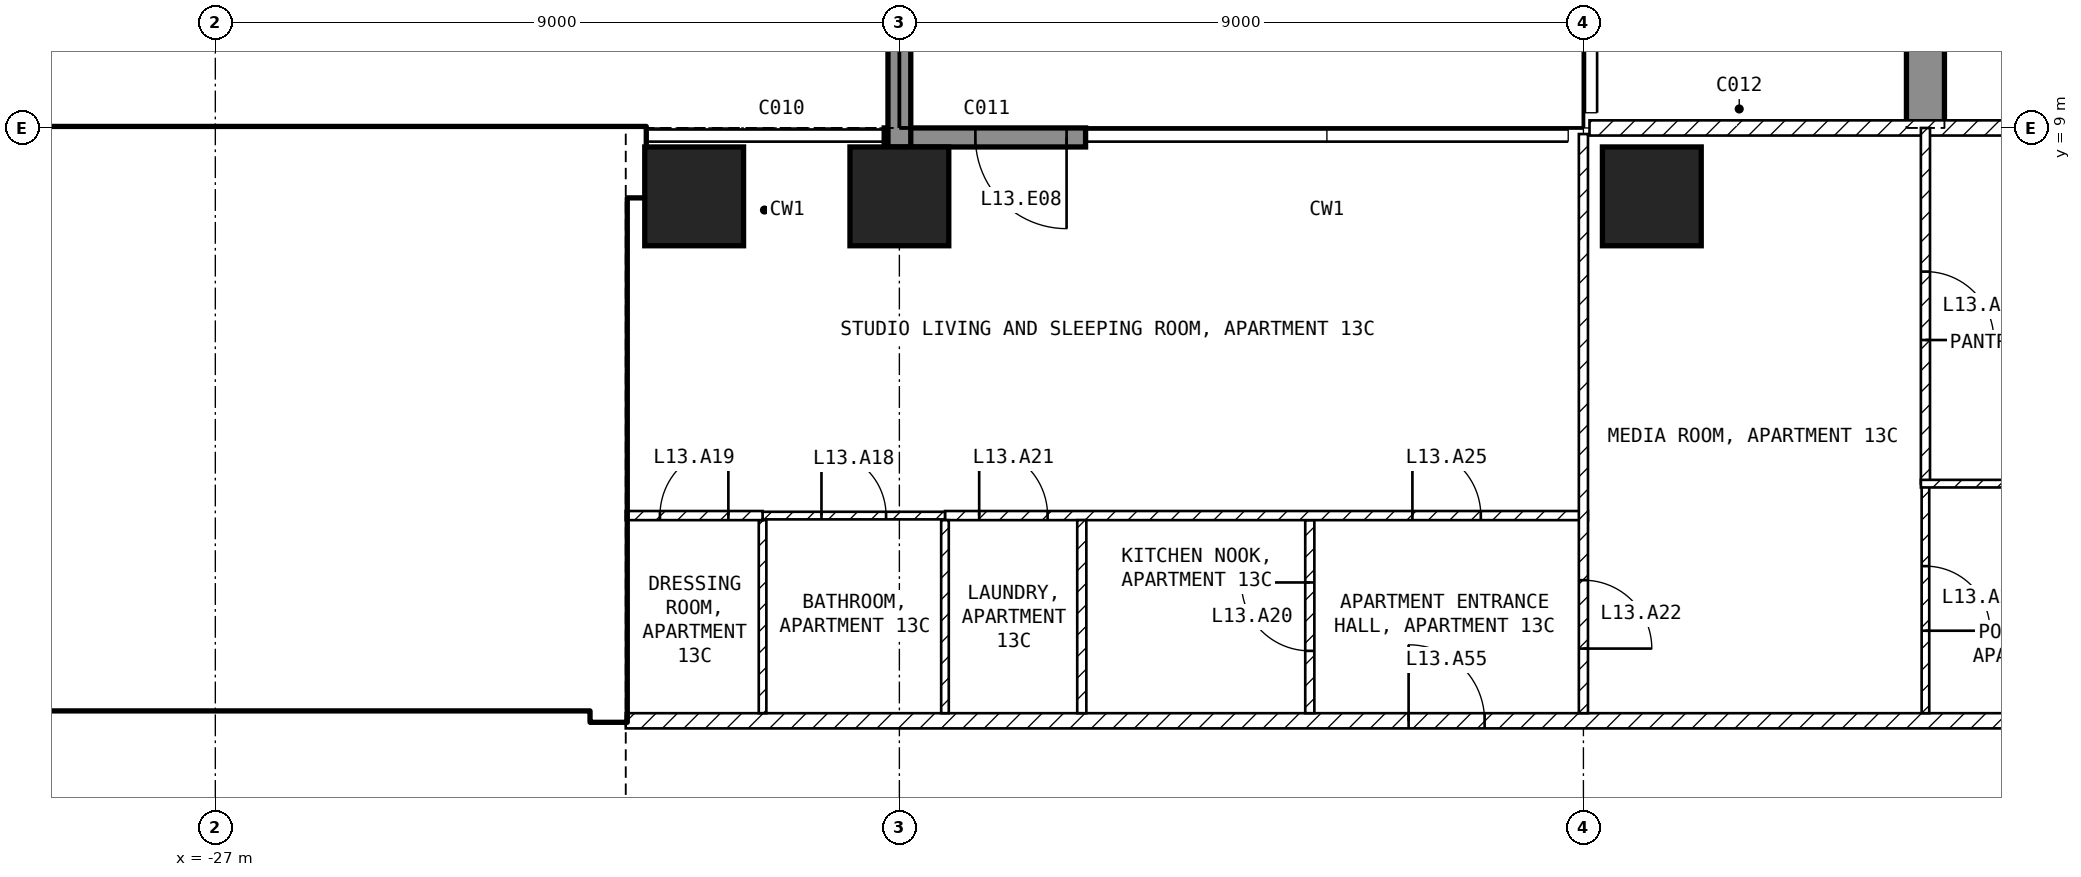
"""IFC4 building model, lengths in metres.
Left out: names, types, materials, properties, quantities, classifications, styles, units other than length and angle.
Written with IfcOpenShell. Run it as: python <this file> out.ifc"""

import sys

from ifc_helpers import new_model, si_unit, direction, frame, frame_2d, origin, origin_2d, place, context, subcontext, project, spatial, polyline, rectangle, outline, extrude, element, fill, save


model = new_model("IFC4")
c1 = context("Model", 3, precision=1e-05, world=origin(), true_north=direction((0.0, 1.0)))
c2 = subcontext(c1, "Body", "Model", "MODEL_VIEW")
j1 = project(units=[si_unit("LENGTHUNIT", "METRE"), si_unit("PLANEANGLEUNIT", "RADIAN")], contexts=[c1])
p1 = place(None, origin())
s1 = spatial("IfcSite", under=j1, at=p1, CompositionType="ELEMENT")
p2 = place(p1, origin())
s2 = spatial("IfcBuilding", under=s1, at=p2, CompositionType="ELEMENT")
p3 = place(p2, frame((0.0, 0.0, 64.5)))
s3 = spatial("IfcBuildingStorey", under=s2, at=p3, CompositionType="ELEMENT", Elevation=64.5)
for number, where, z_axis, x_axis in (
    (1, (-20.7, 8.1, -0.25), (0.0, 0.0, 1.0), (1.0, 0.0, 0.0)),
    (2, (-18.0, 8.1, -0.25), (0.0, 0.0, 1.0), (1.0, 0.0, 0.0)),
    (3, (-8.1, 8.1, -0.25), (0.0, 0.0, 1.0), (1.0, 0.0, 0.0)),
):
    element("IfcColumn", number, at=place(p3, frame(where, z_axis=z_axis, x_axis=x_axis)), inside=s3, PredefinedType="COLUMN", context=c2, shape_type="SweptSolid", body=[
        extrude(rectangle(XDim=1.3, YDim=1.3, at=origin_2d()), origin(), (0.0, 0.0, 1.0), 3.5),
    ])
p4 = place(p3, frame((-4.75, 9.0, -0.25), z_axis=(1.0, 0.0, 0.0), x_axis=(0.0, 1.0, 0.0)))
e4 = element("IfcWall", 4, at=p4, inside=s3, PredefinedType="SHEAR", context=c2, shape_type="SweptSolid", body=[
    extrude(outline(polyline([(0.0, 0.0), (2.1, 0.0), (2.1, 2.65), (4.5, 2.65), (4.5, 0.0), (9.9, 0.0), (9.9, 2.65), (12.3, 2.65), (12.3, 0.0), (16.45, 0.0), (16.45, 3.5), (0.0, 3.5), (0.0, 0.0)])), origin(), (0.0, 0.0, 1.0), 0.5),
])
p5 = place(p3, frame((-15.55, 8.875, 0.0), z_axis=(0.0, 0.0, 1.0), x_axis=(-1.0, 0.0, 0.0)))
e5 = element("IfcWall", 5, at=p5, inside=s3, PredefinedType="SOLIDWALL", context=c2, shape_type="SweptSolid", body=[
    extrude(rectangle(XDim=2.65, YDim=0.25, at=frame_2d((1.325, 0.0))), origin(), (0.0, 0.0, 1.0), 3.25),
])
p6 = place(p5, frame((0.25, 0.0, 0.0)))
e6 = element("IfcOpeningElement", 6, at=p6, cuts=e5, PredefinedType="OPENING", context=c2, shape_type="SweptSolid", body=[
    extrude(rectangle(XDim=1.2, YDim=2.4, at=frame_2d((0.6, 1.2))), frame((0.0, 0.135, 0.0), z_axis=(0.0, -1.0, 0.0), x_axis=(1.0, 0.0, 0.0)), (0.0, 0.0, 1.0), 0.27),
])
p7 = place(p3, frame((-18.0, 8.75, 0.0), z_axis=(0.0, 0.0, 1.0), x_axis=(0.0, 1.0, 0.0)))
e7 = element("IfcWall", 7, at=p7, inside=s3, PredefinedType="SOLIDWALL", context=c2, shape_type="SweptSolid", body=[
    extrude(rectangle(XDim=2.95, YDim=0.3, at=frame_2d((1.475, 0.0))), origin(), (0.0, 0.0, 1.0), 3.25),
])
p8 = place(p3, frame((-31.5, 8.55, 0.0), z_axis=(0.0, 0.0, 1.0), x_axis=(1.0, 0.0, 0.0)))
e8 = element("IfcWall", 8, at=p8, inside=s3, PredefinedType="SHEAR", context=c2, shape_type="SweptSolid", body=[
    extrude(rectangle(XDim=10.15, YDim=0.9, at=frame_2d((5.075, 0.0))), origin(), (0.0, 0.0, 1.0), 3.25),
])
p9 = place(p3, frame((-21.825, 1.2, 0.0), z_axis=(0.0, 0.0, 1.0), x_axis=(0.0, 1.0, 0.0)))
e9 = element("IfcWall", 9, at=p9, inside=s3, PredefinedType="SHEAR", context=c2, shape_type="SweptSolid", body=[
    extrude(rectangle(XDim=6.9, YDim=0.45, at=frame_2d((3.45, 0.0))), origin(), (0.0, 0.0, 1.0), 3.25),
])
p10 = place(p3, frame((-35.1, 1.45, 0.0), z_axis=(0.0, 0.0, 1.0), x_axis=(1.0, 0.0, 0.0)))
e10 = element("IfcWall", 10, at=p10, inside=s3, PredefinedType="SOLIDWALL", context=c2, shape_type="SweptSolid", body=[
    extrude(rectangle(XDim=13.05, YDim=0.2, at=frame_2d((6.525, 0.0))), origin(), (0.0, 0.0, 1.0), 3.25),
])
p11 = place(p10, frame((11.3, 0.0, 0.0)))
e11 = element("IfcOpeningElement", 11, at=p11, cuts=e10, PredefinedType="OPENING", context=c2, shape_type="SweptSolid", body=[
    extrude(rectangle(XDim=1.0, YDim=2.1, at=frame_2d((0.5, 1.05))), frame((0.0, 0.11, 0.0), z_axis=(0.0, -1.0, 0.0), x_axis=(1.0, 0.0, 0.0)), (0.0, 0.0, 1.0), 0.22),
])
p12 = place(p10, frame((8.8, 0.0, 0.0)))
e12 = element("IfcOpeningElement", 12, at=p12, cuts=e10, PredefinedType="OPENING", context=c2, shape_type="SweptSolid", body=[
    extrude(rectangle(XDim=1.0, YDim=2.1, at=frame_2d((0.5, 1.05))), frame((0.0, 0.11, 0.0), z_axis=(0.0, -1.0, 0.0), x_axis=(1.0, 0.0, 0.0)), (0.0, 0.0, 1.0), 0.22),
])
p13 = place(p3, frame((-28.35, 5.15, 0.0), z_axis=(0.0, 0.0, 1.0), x_axis=(1.0, 0.0, 0.0)))
e13 = element("IfcWall", 13, at=p13, inside=s3, PredefinedType="SOLIDWALL", context=c2, shape_type="SweptSolid", body=[
    extrude(rectangle(XDim=6.3, YDim=0.2, at=frame_2d((3.15, 0.0))), origin(), (0.0, 0.0, 1.0), 3.25),
])
p14 = place(p13, frame((5.1, 0.0, 0.0)))
e14 = element("IfcOpeningElement", 14, at=p14, cuts=e13, PredefinedType="OPENING", context=c2, shape_type="SweptSolid", body=[
    extrude(rectangle(XDim=1.0, YDim=2.1, at=frame_2d((0.5, 1.05))), frame((0.0, 0.11, 0.0), z_axis=(0.0, -1.0, 0.0), x_axis=(1.0, 0.0, 0.0)), (0.0, 0.0, 1.0), 0.22),
])
p15 = place(p3, frame((-28.25, 5.25, 0.0), z_axis=(0.0, 0.0, 1.0), x_axis=(0.0, 1.0, 0.0)))
e15 = element("IfcWall", 15, at=p15, inside=s3, PredefinedType="SOLIDWALL", context=c2, shape_type="SweptSolid", body=[
    extrude(rectangle(XDim=2.85, YDim=0.2, at=frame_2d((1.425, 0.0))), origin(), (0.0, 0.0, 1.0), 3.25),
])
p16 = place(p3, frame((-35.1, 3.95, 0.0), z_axis=(0.0, 0.0, 1.0), x_axis=(1.0, 0.0, 0.0)))
e16 = element("IfcWall", 16, at=p16, inside=s3, PredefinedType="SOLIDWALL", context=c2, shape_type="SweptSolid", body=[
    extrude(rectangle(XDim=7.9, YDim=0.2, at=frame_2d((3.95, 0.0))), origin(), (0.0, 0.0, 1.0), 3.25),
])
p17 = place(p3, frame((-27.1, 1.55, 0.0), z_axis=(0.0, 0.0, 1.0), x_axis=(0.0, 1.0, 0.0)))
e17 = element("IfcWall", 17, at=p17, inside=s3, PredefinedType="SOLIDWALL", context=c2, shape_type="SweptSolid", body=[
    extrude(rectangle(XDim=3.5, YDim=0.2, at=frame_2d((1.75, 0.0))), origin(), (0.0, 0.0, 1.0), 3.25),
])
p18 = place(p17, frame((0.6, 0.0, 0.0)))
e18 = element("IfcOpeningElement", 18, at=p18, cuts=e17, PredefinedType="OPENING", context=c2, shape_type="SweptSolid", body=[
    extrude(rectangle(XDim=1.1, YDim=2.1, at=frame_2d((0.55, 1.05))), frame((0.0, 0.11, 0.0), z_axis=(0.0, -1.0, 0.0), x_axis=(1.0, 0.0, 0.0)), (0.0, 0.0, 1.0), 0.22),
])
p19 = place(p17, frame((2.6, 0.0, 0.0)))
e19 = element("IfcOpeningElement", 19, at=p19, cuts=e17, PredefinedType="OPENING", context=c2, shape_type="SweptSolid", body=[
    extrude(rectangle(XDim=0.8, YDim=2.1, at=frame_2d((0.4, 1.05))), frame((0.0, 0.11, 0.0), z_axis=(0.0, -1.0, 0.0), x_axis=(1.0, 0.0, 0.0)), (0.0, 0.0, 1.0), 0.22),
])
p20 = place(p3, frame((-21.6, 1.2, 0.0), z_axis=(0.0, 0.0, 1.0), x_axis=(1.0, 0.0, 0.0)))
e20 = element("IfcWall", 20, at=p20, inside=s3, PredefinedType="PARTITIONING", context=c2, shape_type="SweptSolid", body=[
    extrude(rectangle(XDim=20.5, YDim=0.2, at=frame_2d((10.25, 0.0))), origin(), (0.0, 0.0, 1.0), 3.25),
])
p21 = place(p20, frame((10.3, 0.0, 0.0)))
e21 = element("IfcOpeningElement", 21, at=p21, cuts=e20, PredefinedType="OPENING", context=c2, shape_type="SweptSolid", body=[
    extrude(rectangle(XDim=1.0, YDim=2.1, at=frame_2d((0.5, 1.05))), frame((0.0, 0.11, 0.0), z_axis=(0.0, -1.0, 0.0), x_axis=(1.0, 0.0, 0.0)), (0.0, 0.0, 1.0), 0.22),
])
p22 = place(p3, frame((-8.92, 9.0, 0.0), z_axis=(0.0, 0.0, 1.0), x_axis=(1.0, 0.0, 0.0)))
e22 = element("IfcWall", 22, at=p22, inside=s3, PredefinedType="PARTITIONING", context=c2, shape_type="SweptSolid", body=[
    extrude(rectangle(XDim=17.84, YDim=0.2, at=frame_2d((8.92, 0.0))), origin(), (0.0, 0.0, 1.0), 3.25),
])
p23 = place(p22, frame((8.42, 0.0, 0.0)))
e23 = element("IfcOpeningElement", 23, at=p23, cuts=e22, PredefinedType="OPENING", context=c2, shape_type="SweptSolid", body=[
    extrude(rectangle(XDim=1.0, YDim=2.1, at=frame_2d((0.5, 1.05))), frame((0.0, 0.11, 0.0), z_axis=(0.0, -1.0, 0.0), x_axis=(1.0, 0.0, 0.0)), (0.0, 0.0, 1.0), 0.22),
])
p24 = place(p3, frame((-12.6, 1.3, 0.0), z_axis=(0.0, 0.0, 1.0), x_axis=(0.0, 1.0, 0.0)))
e24 = element("IfcWall", 24, at=p24, inside=s3, PredefinedType="PARTITIONING", context=c2, shape_type="SweptSolid", body=[
    extrude(rectangle(XDim=2.54, YDim=0.12, at=frame_2d((1.27, 0.0))), origin(), (0.0, 0.0, 1.0), 3.25),
])
p25 = place(p24, frame((0.82, 0.0, 0.0)))
e25 = element("IfcOpeningElement", 25, at=p25, cuts=e24, PredefinedType="OPENING", context=c2, shape_type="SweptSolid", body=[
    extrude(rectangle(XDim=0.9, YDim=2.1, at=frame_2d((0.45, 1.05))), frame((0.0, 0.07, 0.0), z_axis=(0.0, -1.0, 0.0), x_axis=(1.0, 0.0, 0.0)), (0.0, 0.0, 1.0), 0.14),
])
p26 = place(p3, frame((-17.4, 3.9, 0.0), z_axis=(0.0, 0.0, 1.0), x_axis=(1.0, 0.0, 0.0)))
e26 = element("IfcWall", 26, at=p26, inside=s3, PredefinedType="PARTITIONING", context=c2, shape_type="SweptSolid", body=[
    extrude(rectangle(XDim=8.46, YDim=0.12, at=frame_2d((4.23, 0.0))), origin(), (0.0, 0.0, 1.0), 3.25),
])
p27 = place(p26, frame((0.45, 0.0, 0.0)))
e27 = element("IfcOpeningElement", 27, at=p27, cuts=e26, PredefinedType="OPENING", context=c2, shape_type="SweptSolid", body=[
    extrude(rectangle(XDim=0.9, YDim=2.1, at=frame_2d((0.45, 1.05))), frame((0.0, 0.07, 0.0), z_axis=(0.0, -1.0, 0.0), x_axis=(1.0, 0.0, 0.0)), (0.0, 0.0, 1.0), 0.14),
])
p28 = place(p26, frame((6.15, 0.0, 0.0)))
e28 = element("IfcOpeningElement", 28, at=p28, cuts=e26, PredefinedType="OPENING", context=c2, shape_type="SweptSolid", body=[
    extrude(rectangle(XDim=0.9, YDim=2.1, at=frame_2d((0.45, 1.05))), frame((0.0, 0.07, 0.0), z_axis=(0.0, -1.0, 0.0), x_axis=(1.0, 0.0, 0.0)), (0.0, 0.0, 1.0), 0.14),
])
p29 = place(p3, frame((-9.0, 8.92, 0.0), z_axis=(0.0, 0.0, 1.0), x_axis=(0.0, -1.0, 0.0)))
e29 = element("IfcWall", 29, at=p29, inside=s3, PredefinedType="PARTITIONING", context=c2, shape_type="SweptSolid", body=[
    extrude(rectangle(XDim=7.62, YDim=0.12, at=frame_2d((3.81, 0.0))), origin(), (0.0, 0.0, 1.0), 3.25),
])
p30 = place(p29, frame((5.87, 0.0, 0.0)))
e30 = element("IfcOpeningElement", 30, at=p30, cuts=e29, PredefinedType="OPENING", context=c2, shape_type="SweptSolid", body=[
    extrude(rectangle(XDim=0.9, YDim=2.1, at=frame_2d((0.45, 1.05))), frame((0.0, 0.07, 0.0), z_axis=(0.0, -1.0, 0.0), x_axis=(1.0, 0.0, 0.0)), (0.0, 0.0, 1.0), 0.14),
])
p31 = place(p3, frame((-15.6, 1.3, 0.0), z_axis=(0.0, 0.0, 1.0), x_axis=(0.0, 1.0, 0.0)))
e31 = element("IfcWall", 31, at=p31, inside=s3, PredefinedType="PARTITIONING", context=c2, shape_type="SweptSolid", body=[
    extrude(rectangle(XDim=2.54, YDim=0.12, at=frame_2d((1.27, 0.0))), origin(), (0.0, 0.0, 1.0), 3.25),
])
for number, where, z_axis, x_axis in (
    (32, (-17.4, 1.3, 0.0), (0.0, 0.0, 1.0), (0.0, 1.0, 0.0)),
    (33, (-19.8, 1.3, 0.0), (0.0, 0.0, 1.0), (0.0, 1.0, 0.0)),
):
    element("IfcWall", number, at=place(p3, frame(where, z_axis=z_axis, x_axis=x_axis)), inside=s3, PredefinedType="PARTITIONING", context=c2, shape_type="SweptSolid", body=[
        extrude(rectangle(XDim=2.54, YDim=0.1, at=frame_2d((1.27, 0.0))), origin(), (0.0, 0.0, 1.0), 3.25),
    ])
p32 = place(p3, frame((-19.8, 3.9, 0.0), z_axis=(0.0, 0.0, 1.0), x_axis=(1.0, 0.0, 0.0)))
e34 = element("IfcWall", 34, at=p32, inside=s3, PredefinedType="PARTITIONING", context=c2, shape_type="SweptSolid", body=[
    extrude(rectangle(XDim=2.4, YDim=0.1, at=frame_2d((1.2, 0.0))), origin(), (0.0, 0.0, 1.0), 3.25),
])
p33 = place(p32, frame((0.775, 0.0, 0.0)))
e35 = element("IfcOpeningElement", 35, at=p33, cuts=e34, PredefinedType="OPENING", context=c2, shape_type="SweptSolid", body=[
    extrude(rectangle(XDim=0.85, YDim=2.1, at=frame_2d((0.425, 1.05))), frame((0.0, 0.06, 0.0), z_axis=(0.0, -1.0, 0.0), x_axis=(1.0, 0.0, 0.0)), (0.0, 0.0, 1.0), 0.12),
])
p34 = place(p3, frame((-21.6, 3.9, 0.0), z_axis=(0.0, 0.0, 1.0), x_axis=(1.0, 0.0, 0.0)))
e36 = element("IfcWall", 36, at=p34, inside=s3, PredefinedType="PARTITIONING", context=c2, shape_type="SweptSolid", body=[
    extrude(rectangle(XDim=1.8, YDim=0.12, at=frame_2d((0.9, 0.0))), origin(), (0.0, 0.0, 1.0), 3.25),
])
p35 = place(p34, frame((0.45, 0.0, 0.0)))
e37 = element("IfcOpeningElement", 37, at=p35, cuts=e36, PredefinedType="OPENING", context=c2, shape_type="SweptSolid", body=[
    extrude(rectangle(XDim=0.9, YDim=2.1, at=frame_2d((0.45, 1.05))), frame((0.0, 0.07, 0.0), z_axis=(0.0, -1.0, 0.0), x_axis=(1.0, 0.0, 0.0)), (0.0, 0.0, 1.0), 0.14),
])
p36 = place(p3, frame((-4.5, 4.32, 0.0), z_axis=(0.0, 0.0, 1.0), x_axis=(0.0, -1.0, 0.0)))
e38 = element("IfcWall", 38, at=p36, inside=s3, PredefinedType="PARTITIONING", context=c2, shape_type="SweptSolid", body=[
    extrude(rectangle(XDim=3.02, YDim=0.1, at=frame_2d((1.51, 0.0))), origin(), (0.0, 0.0, 1.0), 3.25),
])
p37 = place(p36, frame((1.085, 0.0, 0.0)))
e39 = element("IfcOpeningElement", 39, at=p37, cuts=e38, PredefinedType="OPENING", context=c2, shape_type="SweptSolid", body=[
    extrude(rectangle(XDim=0.85, YDim=2.1, at=frame_2d((0.425, 1.05))), frame((0.0, 0.06, 0.0), z_axis=(0.0, -1.0, 0.0), x_axis=(1.0, 0.0, 0.0)), (0.0, 0.0, 1.0), 0.12),
])
p38 = place(p3, frame((-4.5, 9.0, 0.0), z_axis=(0.0, 0.0, 1.0), x_axis=(0.0, -1.0, 0.0)))
e40 = element("IfcWall", 40, at=p38, inside=s3, PredefinedType="PARTITIONING", context=c2, shape_type="SweptSolid", body=[
    extrude(rectangle(XDim=4.68, YDim=0.12, at=frame_2d((2.34, 0.0))), origin(), (0.0, 0.0, 1.0), 3.25),
])
p39 = place(p38, frame((1.89, 0.0, 0.0)))
e41 = element("IfcOpeningElement", 41, at=p39, cuts=e40, PredefinedType="OPENING", context=c2, shape_type="SweptSolid", body=[
    extrude(rectangle(XDim=0.9, YDim=2.1, at=frame_2d((0.45, 1.05))), frame((0.0, 0.07, 0.0), z_axis=(0.0, -1.0, 0.0), x_axis=(1.0, 0.0, 0.0)), (0.0, 0.0, 1.0), 0.14),
])
p40 = place(p3, frame((-4.56, 4.32, 0.0), z_axis=(0.0, 0.0, 1.0), x_axis=(1.0, 0.0, 0.0)))
e42 = element("IfcWall", 42, at=p40, inside=s3, PredefinedType="PARTITIONING", context=c2, shape_type="SweptSolid", body=[
    extrude(rectangle(XDim=3.46, YDim=0.1, at=frame_2d((1.73, 0.0))), origin(), (0.0, 0.0, 1.0), 3.25),
])
p41 = place(p6, origin())
e43 = element("IfcDoor", 43, at=p41, inside=s3, OperationType="SINGLE_SWING_LEFT", PredefinedType="DOOR", context=c2, shape_type="SweptSolid", body=[
    extrude(rectangle(XDim=1.2, YDim=2.4, at=frame_2d((0.6, 1.2))), frame((0.0, 0.025, 0.0), z_axis=(0.0, -1.0, 0.0), x_axis=(1.0, 0.0, 0.0)), (0.0, 0.0, 1.0), 0.05),
])
fill(e6, e43)
p42 = place(p18, origin())
e44 = element("IfcDoor", 44, at=p42, inside=s3, OperationType="DOUBLE_DOOR_SLIDING", PredefinedType="DOOR", context=c2, shape_type="SweptSolid", body=[
    extrude(rectangle(XDim=1.1, YDim=2.1, at=frame_2d((0.55, 1.05))), frame((0.0, 0.025, 0.0), z_axis=(0.0, -1.0, 0.0), x_axis=(1.0, 0.0, 0.0)), (0.0, 0.0, 1.0), 0.05),
])
fill(e18, e44)
p43 = place(p14, origin())
e45 = element("IfcDoor", 45, at=p43, inside=s3, OperationType="SINGLE_SWING_LEFT", PredefinedType="DOOR", context=c2, shape_type="SweptSolid", body=[
    extrude(rectangle(XDim=1.0, YDim=2.1, at=frame_2d((0.5, 1.05))), frame((0.0, 0.025, 0.0), z_axis=(0.0, -1.0, 0.0), x_axis=(1.0, 0.0, 0.0)), (0.0, 0.0, 1.0), 0.05),
])
fill(e14, e45)
p44 = place(p11, origin())
e46 = element("IfcDoor", 46, at=p44, inside=s3, OperationType="SINGLE_SWING_LEFT", PredefinedType="DOOR", context=c2, shape_type="SweptSolid", body=[
    extrude(rectangle(XDim=1.0, YDim=2.1, at=frame_2d((0.5, 1.05))), frame((0.0, 0.025, 0.0), z_axis=(0.0, -1.0, 0.0), x_axis=(1.0, 0.0, 0.0)), (0.0, 0.0, 1.0), 0.05),
])
fill(e11, e46)
p45 = place(p12, origin())
e47 = element("IfcDoor", 47, at=p45, inside=s3, OperationType="SINGLE_SWING_LEFT", PredefinedType="DOOR", context=c2, shape_type="SweptSolid", body=[
    extrude(rectangle(XDim=1.0, YDim=2.1, at=frame_2d((0.5, 1.05))), frame((0.0, 0.025, 0.0), z_axis=(0.0, -1.0, 0.0), x_axis=(1.0, 0.0, 0.0)), (0.0, 0.0, 1.0), 0.05),
])
fill(e12, e47)
p46 = place(p19, origin())
e48 = element("IfcDoor", 48, at=p46, inside=s3, OperationType="SINGLE_SWING_LEFT", PredefinedType="DOOR", context=c2, shape_type="SweptSolid", body=[
    extrude(rectangle(XDim=0.8, YDim=2.1, at=frame_2d((0.4, 1.05))), frame((0.0, 0.025, 0.0), z_axis=(0.0, -1.0, 0.0), x_axis=(1.0, 0.0, 0.0)), (0.0, 0.0, 1.0), 0.05),
])
fill(e19, e48)
p47 = place(p33, origin())
e49 = element("IfcDoor", 49, at=p47, inside=s3, OperationType="SINGLE_SWING_LEFT", PredefinedType="DOOR", context=c2, shape_type="SweptSolid", body=[
    extrude(rectangle(XDim=0.85, YDim=2.1, at=frame_2d((0.425, 1.05))), frame((0.0, 0.025, 0.0), z_axis=(0.0, -1.0, 0.0), x_axis=(1.0, 0.0, 0.0)), (0.0, 0.0, 1.0), 0.05),
])
fill(e35, e49)
p48 = place(p35, origin())
e50 = element("IfcDoor", 50, at=p48, inside=s3, OperationType="SINGLE_SWING_RIGHT", PredefinedType="DOOR", context=c2, shape_type="SweptSolid", body=[
    extrude(rectangle(XDim=0.9, YDim=2.1, at=frame_2d((0.45, 1.05))), frame((0.0, 0.025, 0.0), z_axis=(0.0, -1.0, 0.0), x_axis=(1.0, 0.0, 0.0)), (0.0, 0.0, 1.0), 0.05),
])
fill(e37, e50)
p49 = place(p25, origin())
e51 = element("IfcDoor", 51, at=p49, inside=s3, OperationType="SINGLE_SWING_RIGHT", PredefinedType="DOOR", context=c2, shape_type="SweptSolid", body=[
    extrude(rectangle(XDim=0.9, YDim=2.1, at=frame_2d((0.45, 1.05))), frame((0.0, 0.025, 0.0), z_axis=(0.0, -1.0, 0.0), x_axis=(1.0, 0.0, 0.0)), (0.0, 0.0, 1.0), 0.05),
])
fill(e25, e51)
p50 = place(p27, origin())
e52 = element("IfcDoor", 52, at=p50, inside=s3, OperationType="SINGLE_SWING_LEFT", PredefinedType="DOOR", context=c2, shape_type="SweptSolid", body=[
    extrude(rectangle(XDim=0.9, YDim=2.1, at=frame_2d((0.45, 1.05))), frame((0.0, 0.025, 0.0), z_axis=(0.0, -1.0, 0.0), x_axis=(1.0, 0.0, 0.0)), (0.0, 0.0, 1.0), 0.05),
])
fill(e27, e52)
p51 = place(p30, origin())
e53 = element("IfcDoor", 53, at=p51, inside=s3, OperationType="SINGLE_SWING_RIGHT", PredefinedType="DOOR", context=c2, shape_type="SweptSolid", body=[
    extrude(rectangle(XDim=0.9, YDim=2.1, at=frame_2d((0.45, 1.05))), frame((0.0, 0.025, 0.0), z_axis=(0.0, -1.0, 0.0), x_axis=(1.0, 0.0, 0.0)), (0.0, 0.0, 1.0), 0.05),
])
fill(e30, e53)
p52 = place(p39, origin())
e54 = element("IfcDoor", 54, at=p52, inside=s3, OperationType="SINGLE_SWING_RIGHT", PredefinedType="DOOR", context=c2, shape_type="SweptSolid", body=[
    extrude(rectangle(XDim=0.9, YDim=2.1, at=frame_2d((0.45, 1.05))), frame((0.0, 0.025, 0.0), z_axis=(0.0, -1.0, 0.0), x_axis=(1.0, 0.0, 0.0)), (0.0, 0.0, 1.0), 0.05),
])
fill(e41, e54)
p53 = place(p37, origin())
e55 = element("IfcDoor", 55, at=p53, inside=s3, OperationType="SINGLE_SWING_RIGHT", PredefinedType="DOOR", context=c2, shape_type="SweptSolid", body=[
    extrude(rectangle(XDim=0.85, YDim=2.1, at=frame_2d((0.425, 1.05))), frame((0.0, 0.025, 0.0), z_axis=(0.0, -1.0, 0.0), x_axis=(1.0, 0.0, 0.0)), (0.0, 0.0, 1.0), 0.05),
])
fill(e39, e55)
p54 = place(p28, origin())
e56 = element("IfcDoor", 56, at=p54, inside=s3, OperationType="SINGLE_SWING_LEFT", PredefinedType="DOOR", context=c2, shape_type="SweptSolid", body=[
    extrude(rectangle(XDim=0.9, YDim=2.1, at=frame_2d((0.45, 1.05))), frame((0.0, 0.025, 0.0), z_axis=(0.0, -1.0, 0.0), x_axis=(1.0, 0.0, 0.0)), (0.0, 0.0, 1.0), 0.05),
])
fill(e28, e56)
p55 = place(p21, origin())
e57 = element("IfcDoor", 57, at=p55, inside=s3, OperationType="SINGLE_SWING_LEFT", PredefinedType="DOOR", context=c2, shape_type="SweptSolid", body=[
    extrude(rectangle(XDim=1.0, YDim=2.1, at=frame_2d((0.5, 1.05))), frame((0.0, 0.025, 0.0), z_axis=(0.0, -1.0, 0.0), x_axis=(1.0, 0.0, 0.0)), (0.0, 0.0, 1.0), 0.05),
])
fill(e21, e57)
save(model, sys.argv[1])
